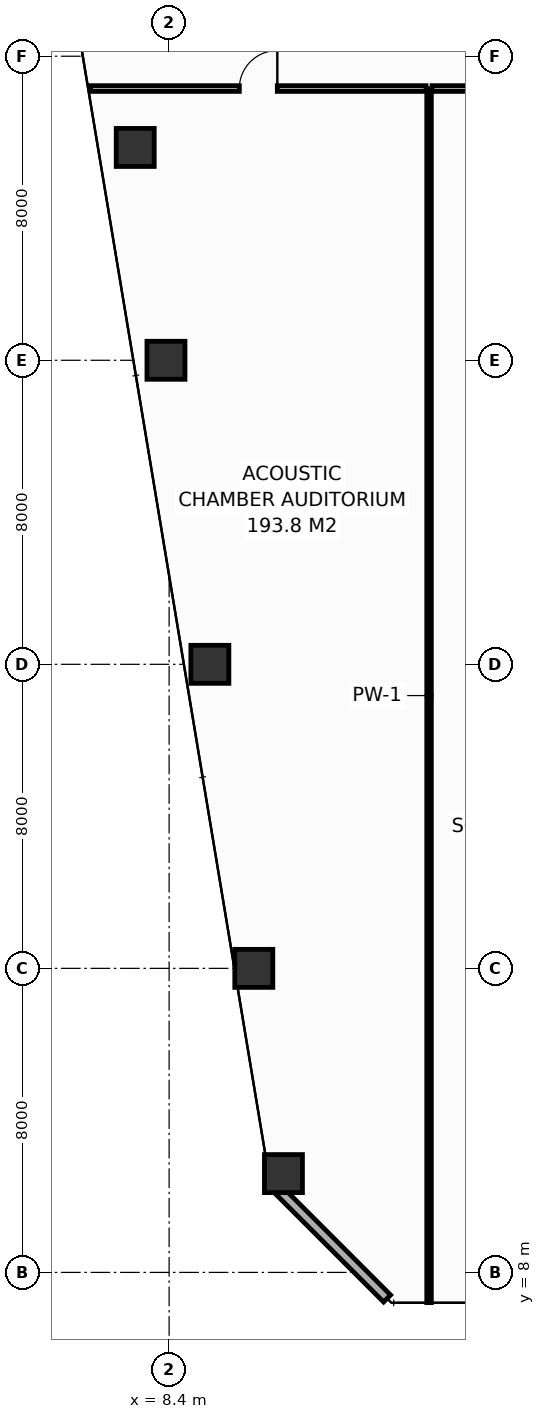
"""IFC4 building model, lengths in metres.
Left out: names, types, materials, properties, quantities, classifications, styles, units other than length and angle.
Written with IfcOpenShell. Run it as: python <this file> out.ifc"""

import sys

from ifc_helpers import new_model, si_unit, direction, frame, frame_2d, origin, origin_2d, place, context, subcontext, project, spatial, rectangle, hollow_rectangle, extrude, element, fill, save


model = new_model("IFC4")
c1 = context("Model", 3, precision=1e-05, world=origin(), true_north=direction((0.0, 1.0)))
c2 = subcontext(c1, "Body", "Model", "MODEL_VIEW")
j1 = project(units=[si_unit("LENGTHUNIT", "METRE"), si_unit("PLANEANGLEUNIT", "RADIAN")], contexts=[c1])
p1 = place(None, origin())
s1 = spatial("IfcSite", under=j1, at=p1, CompositionType="ELEMENT")
p2 = place(p1, origin())
s2 = spatial("IfcBuilding", under=s1, at=p2, CompositionType="ELEMENT")
p3 = place(p2, frame((0.0, 0.0, 148.6)))
s3 = spatial("IfcBuildingStorey", under=s2, at=p3, CompositionType="ELEMENT", Elevation=148.6)
for number, where, z_axis, x_axis in (
    (1, (11.408, 10.6, 0.0), (0.0, 0.0, 1.0), (1.0, 0.0, 0.0)),
    (2, (10.628, 16.0, 0.0), (0.0, 0.0, 1.0), (1.0, 0.0, 0.0)),
    (3, (9.472, 24.0, 0.0), (0.0, 0.0, 1.0), (1.0, 0.0, 0.0)),
    (4, (8.317, 32.0, 0.0), (0.0, 0.0, 1.0), (1.0, 0.0, 0.0)),
    (5, (7.508, 37.6, 0.0), (0.0, 0.0, 1.0), (1.0, 0.0, 0.0)),
):
    element("IfcColumn", number, at=place(p3, frame(where, z_axis=z_axis, x_axis=x_axis)), inside=s3, PredefinedType="COLUMN", context=c2, shape_type="SweptSolid", body=[
        extrude(hollow_rectangle(XDim=1.0, YDim=1.0, WallThickness=0.045, at=origin_2d()), origin(), (0.0, 0.0, 1.0), 3.8),
    ])
p4 = place(p3, frame((11.162, 10.287, 0.0), z_axis=(0.0, 0.0, 1.0), x_axis=(0.70707775441, -0.707135806771, 0.0)))
e6 = element("IfcWall", 6, at=p4, inside=s3, PredefinedType="STANDARD", context=c2, shape_type="SweptSolid", body=[
    extrude(rectangle(XDim=4.206, YDim=0.26, at=frame_2d((2.103, 0.0))), origin(), (0.0, 0.0, 1.0), 3.55),
])
p5 = place(p3, frame((15.24, 7.205, 0.0), z_axis=(0.0, 0.0, 1.0), x_axis=(0.0, 1.0, 0.0)))
e7 = element("IfcWall", 7, at=p5, inside=s3, PredefinedType="PARTITIONING", context=c2, shape_type="SweptSolid", body=[
    extrude(rectangle(XDim=31.945, YDim=0.12, at=frame_2d((15.972, 0.0))), origin(), (0.0, 0.0, 1.0), 2.835),
])
p6 = place(p3, frame((6.334, 39.15, 0.0), z_axis=(0.0, 0.0, 1.0), x_axis=(1.0, 0.0, 0.0)))
e8 = element("IfcWall", 8, at=p6, inside=s3, PredefinedType="PARTITIONING", context=c2, shape_type="SweptSolid", body=[
    extrude(rectangle(XDim=8.826, YDim=0.15, at=frame_2d((4.413, 0.0))), origin(), (0.0, 0.0, 1.0), 3.035),
])
p7 = place(p6, frame((3.913, 0.0, 0.0)))
e9 = element("IfcOpeningElement", 9, at=p7, cuts=e8, PredefinedType="OPENING", context=c2, shape_type="SweptSolid", body=[
    extrude(rectangle(XDim=1.0, YDim=2.15, at=frame_2d((0.5, 1.075))), frame((0.0, 0.085, 0.0), z_axis=(0.0, -1.0, 0.0), x_axis=(1.0, 0.0, 0.0)), (0.0, 0.0, 1.0), 0.17),
])
p8 = place(p3, frame((15.32, 39.15, 0.0), z_axis=(0.0, 0.0, 1.0), x_axis=(1.0, 0.0, 0.0)))
e10 = element("IfcWall", 10, at=p8, inside=s3, PredefinedType="PARTITIONING", context=c2, shape_type="SweptSolid", body=[
    extrude(rectangle(XDim=8.53, YDim=0.15, at=frame_2d((4.265, 0.0))), origin(), (0.0, 0.0, 1.0), 2.835),
])
p9 = place(p8, frame((3.985, 0.0, 0.0)))
e11 = element("IfcOpeningElement", 11, at=p9, cuts=e10, PredefinedType="OPENING", context=c2, shape_type="SweptSolid", body=[
    extrude(rectangle(XDim=1.0, YDim=2.15, at=frame_2d((0.5, 1.075))), frame((0.0, 0.085, 0.0), z_axis=(0.0, -1.0, 0.0), x_axis=(1.0, 0.0, 0.0)), (0.0, 0.0, 1.0), 0.17),
])
p10 = place(p7, origin())
e12 = element("IfcDoor", 12, at=p10, inside=s3, OperationType="SINGLE_SWING_RIGHT", PredefinedType="DOOR", context=c2, shape_type="SweptSolid", body=[
    extrude(rectangle(XDim=1.0, YDim=2.15, at=frame_2d((0.5, 1.075))), frame((0.0, 0.025, 0.0), z_axis=(0.0, -1.0, 0.0), x_axis=(1.0, 0.0, 0.0)), (0.0, 0.0, 1.0), 0.05),
])
fill(e9, e12)
save(model, sys.argv[1])
